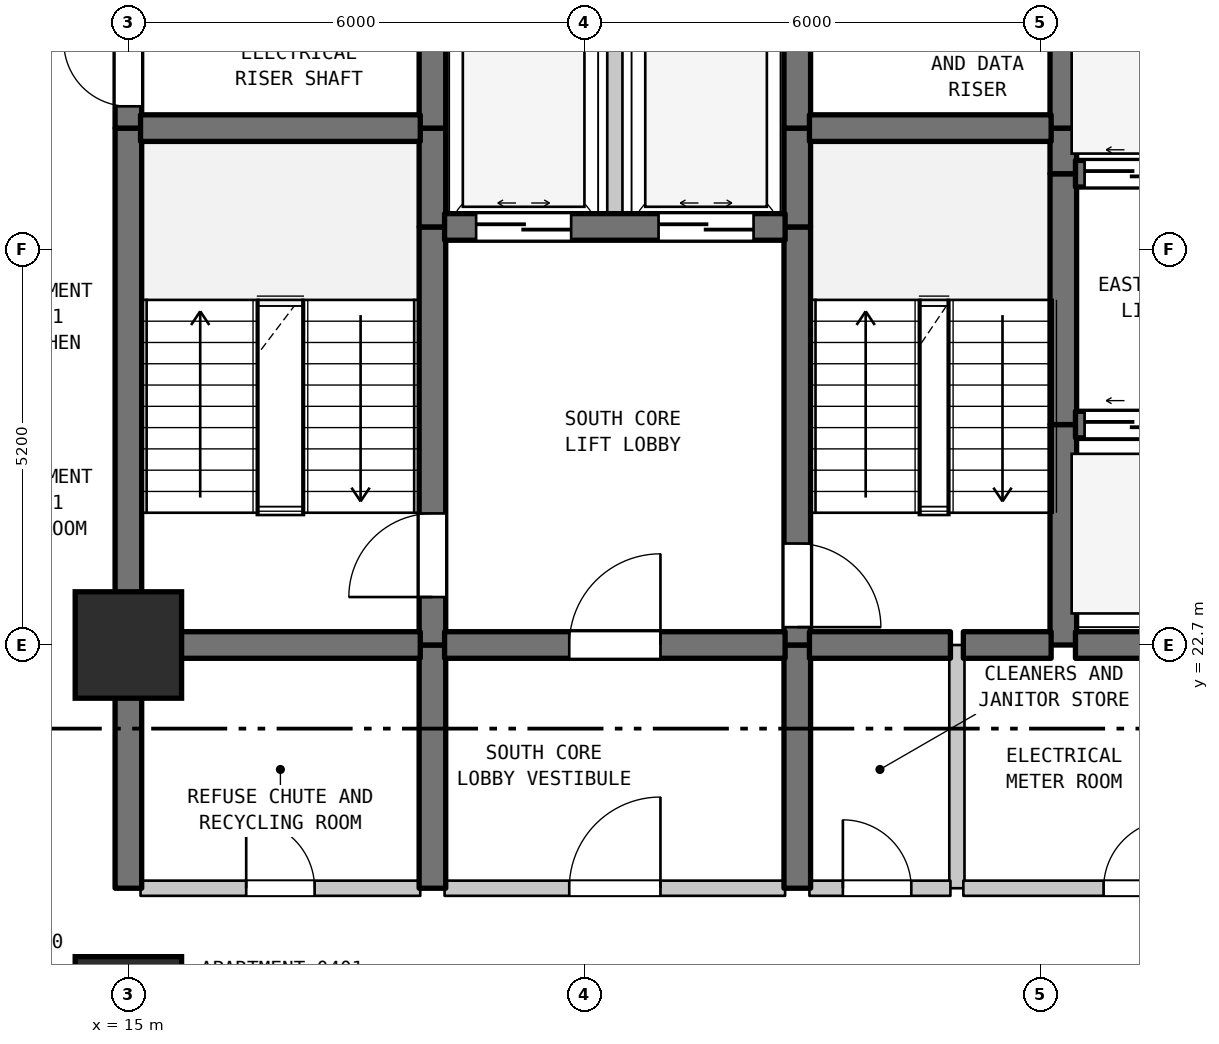
"""IFC4 building model, lengths in metres.
Left out: names, types, materials, properties, quantities, classifications, styles, units other than length and angle.
Written with IfcOpenShell. Run it as: python <this file> out.ifc"""

import sys

from ifc_helpers import new_model, si_unit, direction, frame, frame_2d, origin, origin_2d, place, context, subcontext, project, spatial, rectangle, extrude, element, fill, save


model = new_model("IFC4")
c1 = context("Model", 3, precision=1e-05, world=origin(), true_north=direction((0.0, 1.0)))
c2 = subcontext(c1, "Body", "Model", "MODEL_VIEW")
j1 = project(units=[si_unit("LENGTHUNIT", "METRE"), si_unit("PLANEANGLEUNIT", "RADIAN")], contexts=[c1])
p1 = place(None, origin())
s1 = spatial("IfcSite", under=j1, at=p1, CompositionType="ELEMENT")
p2 = place(p1, origin())
s2 = spatial("IfcBuilding", under=s1, at=p2, CompositionType="ELEMENT")
p3 = place(p2, frame((0.0, 0.0, 24.0)))
s3 = spatial("IfcBuildingStorey", under=s2, at=p3, CompositionType="ELEMENT", Elevation=24.0)
for number, where, z_axis, x_axis in (
    (1, (15.0, 17.9, 0.0), (0.0, 0.0, 1.0), (1.0, 0.0, 0.0)),
    (2, (15.0, 22.7, 0.0), (0.0, 0.0, 1.0), (1.0, 0.0, 0.0)),
):
    element("IfcColumn", number, at=place(p3, frame(where, z_axis=z_axis, x_axis=x_axis)), inside=s3, PredefinedType="COLUMN", context=c2, shape_type="SweptSolid", body=[
        extrude(rectangle(XDim=1.4, YDim=1.4, at=origin_2d()), origin(), (0.0, 0.0, 1.0), 3.7),
    ])
p4 = place(p3, frame((15.0, 19.5, 0.0), z_axis=(0.0, 0.0, 1.0), x_axis=(0.0, 1.0, 0.0)))
e3 = element("IfcWall", 3, at=p4, inside=s3, PredefinedType="SHEAR", context=c2, shape_type="SweptSolid", body=[
    extrude(rectangle(XDim=3.2, YDim=0.35, at=frame_2d((1.6, 0.0))), origin(), (0.0, 0.0, 1.0), 3.385),
])
p5 = place(p3, frame((15.0, 22.7, 0.0), z_axis=(0.0, 0.0, 1.0), x_axis=(0.0, 1.0, 0.0)))
e4 = element("IfcWall", 4, at=p5, inside=s3, PredefinedType="SHEAR", context=c2, shape_type="SweptSolid", body=[
    extrude(rectangle(XDim=6.8, YDim=0.35, at=frame_2d((3.4, 0.0))), origin(), (0.0, 0.0, 1.0), 3.385),
])
p6 = place(p3, frame((15.0, 29.5, 0.0), z_axis=(0.0, 0.0, 1.0), x_axis=(0.0, 1.0, 0.0)))
e5 = element("IfcWall", 5, at=p6, inside=s3, PredefinedType="SHEAR", context=c2, shape_type="SweptSolid", body=[
    extrude(rectangle(XDim=1.6, YDim=0.35, at=frame_2d((0.8, 0.0))), origin(), (0.0, 0.0, 1.0), 3.385),
])
p7 = place(p6, frame((0.287, 0.0, 0.0)))
e6 = element("IfcOpeningElement", 6, at=p7, cuts=e5, PredefinedType="OPENING", context=c2, shape_type="SweptSolid", body=[
    extrude(rectangle(XDim=0.85, YDim=2.1, at=frame_2d((0.425, 1.05))), frame((0.0, 0.185, 0.0), z_axis=(0.0, -1.0, 0.0), x_axis=(1.0, 0.0, 0.0)), (0.0, 0.0, 1.0), 0.37),
])
p8 = place(p3, frame((19.0, 19.5, 0.0), z_axis=(0.0, 0.0, 1.0), x_axis=(0.0, 1.0, 0.0)))
e7 = element("IfcWall", 7, at=p8, inside=s3, PredefinedType="SHEAR", context=c2, shape_type="SweptSolid", body=[
    extrude(rectangle(XDim=3.2, YDim=0.35, at=frame_2d((1.6, 0.0))), origin(), (0.0, 0.0, 1.0), 3.385),
])
p9 = place(p3, frame((19.0, 22.7, 0.0), z_axis=(0.0, 0.0, 1.0), x_axis=(0.0, 1.0, 0.0)))
e8 = element("IfcWall", 8, at=p9, inside=s3, PredefinedType="SHEAR", context=c2, shape_type="SweptSolid", body=[
    extrude(rectangle(XDim=5.5, YDim=0.35, at=frame_2d((2.75, 0.0))), origin(), (0.0, 0.0, 1.0), 3.385),
])
p10 = place(p9, frame((0.631, 0.0, 0.0)))
e9 = element("IfcOpeningElement", 9, at=p10, cuts=e8, PredefinedType="OPENING", context=c2, shape_type="SweptSolid", body=[
    extrude(rectangle(XDim=1.1, YDim=2.15, at=frame_2d((0.55, 1.075))), frame((0.0, 0.185, 0.0), z_axis=(0.0, -1.0, 0.0), x_axis=(1.0, 0.0, 0.0)), (0.0, 0.0, 1.0), 0.37),
])
p11 = place(p3, frame((19.0, 28.2, 0.0), z_axis=(0.0, 0.0, 1.0), x_axis=(0.0, 1.0, 0.0)))
e10 = element("IfcWall", 10, at=p11, inside=s3, PredefinedType="SHEAR", context=c2, shape_type="SweptSolid", body=[
    extrude(rectangle(XDim=1.3, YDim=0.35, at=frame_2d((0.65, 0.0))), origin(), (0.0, 0.0, 1.0), 3.385),
])
p12 = place(p3, frame((19.0, 29.5, 0.0), z_axis=(0.0, 0.0, 1.0), x_axis=(0.0, 1.0, 0.0)))
e11 = element("IfcWall", 11, at=p12, inside=s3, PredefinedType="SHEAR", context=c2, shape_type="SweptSolid", body=[
    extrude(rectangle(XDim=5.5, YDim=0.35, at=frame_2d((2.75, 0.0))), origin(), (0.0, 0.0, 1.0), 3.385),
])
p13 = place(p12, frame((2.025, 0.0, 0.0)))
e12 = element("IfcOpeningElement", 12, at=p13, cuts=e11, PredefinedType="OPENING", context=c2, shape_type="SweptSolid", body=[
    extrude(rectangle(XDim=1.1, YDim=2.15, at=frame_2d((0.55, 1.075))), frame((0.0, 0.185, 0.0), z_axis=(0.0, -1.0, 0.0), x_axis=(1.0, 0.0, 0.0)), (0.0, 0.0, 1.0), 0.37),
])
p14 = place(p3, frame((21.4, 28.2, 0.0), z_axis=(0.0, 0.0, 1.0), x_axis=(0.0, 1.0, 0.0)))
e13 = element("IfcWall", 13, at=p14, inside=s3, PredefinedType="STANDARD", context=c2, shape_type="SweptSolid", body=[
    extrude(rectangle(XDim=2.6, YDim=0.2, at=frame_2d((1.3, 0.0))), origin(), (0.0, 0.0, 1.0), 3.385),
])
p15 = place(p3, frame((23.8, 19.5, 0.0), z_axis=(0.0, 0.0, 1.0), x_axis=(0.0, 1.0, 0.0)))
e14 = element("IfcWall", 14, at=p15, inside=s3, PredefinedType="SHEAR", context=c2, shape_type="SweptSolid", body=[
    extrude(rectangle(XDim=3.2, YDim=0.35, at=frame_2d((1.6, 0.0))), origin(), (0.0, 0.0, 1.0), 3.385),
])
p16 = place(p3, frame((23.8, 22.7, 0.0), z_axis=(0.0, 0.0, 1.0), x_axis=(0.0, 1.0, 0.0)))
e15 = element("IfcWall", 15, at=p16, inside=s3, PredefinedType="SHEAR", context=c2, shape_type="SweptSolid", body=[
    extrude(rectangle(XDim=5.5, YDim=0.35, at=frame_2d((2.75, 0.0))), origin(), (0.0, 0.0, 1.0), 3.385),
])
p17 = place(p16, frame((0.235, 0.0, 0.0)))
e16 = element("IfcOpeningElement", 16, at=p17, cuts=e15, PredefinedType="OPENING", context=c2, shape_type="SweptSolid", body=[
    extrude(rectangle(XDim=1.1, YDim=2.15, at=frame_2d((0.55, 1.075))), frame((0.0, 0.185, 0.0), z_axis=(0.0, -1.0, 0.0), x_axis=(1.0, 0.0, 0.0)), (0.0, 0.0, 1.0), 0.37),
])
for number, where, z_axis, x_axis in (
    (17, (23.8, 28.2, 0.0), (0.0, 0.0, 1.0), (0.0, 1.0, 0.0)),
    (18, (23.8, 29.5, 0.0), (0.0, 0.0, 1.0), (0.0, 1.0, 0.0)),
):
    element("IfcWall", number, at=place(p3, frame(where, z_axis=z_axis, x_axis=x_axis)), inside=s3, PredefinedType="SHEAR", context=c2, shape_type="SweptSolid", body=[
        extrude(rectangle(XDim=1.3, YDim=0.35, at=frame_2d((0.65, 0.0))), origin(), (0.0, 0.0, 1.0), 3.385),
    ])
p18 = place(p3, frame((25.9, 19.5, 0.0), z_axis=(0.0, 0.0, 1.0), x_axis=(0.0, 1.0, 0.0)))
e19 = element("IfcWall", 19, at=p18, inside=s3, PredefinedType="STANDARD", context=c2, shape_type="SweptSolid", body=[
    extrude(rectangle(XDim=3.2, YDim=0.2, at=frame_2d((1.6, 0.0))), origin(), (0.0, 0.0, 1.0), 3.385),
])
p19 = place(p3, frame((27.3, 22.7, 0.0), z_axis=(0.0, 0.0, 1.0), x_axis=(0.0, 1.0, 0.0)))
e20 = element("IfcWall", 20, at=p19, inside=s3, PredefinedType="SHEAR", context=c2, shape_type="SweptSolid", body=[
    extrude(rectangle(XDim=2.9, YDim=0.35, at=frame_2d((1.45, 0.0))), origin(), (0.0, 0.0, 1.0), 3.385),
])
p20 = place(p3, frame((27.3, 25.6, 0.0), z_axis=(0.0, 0.0, 1.0), x_axis=(0.0, 1.0, 0.0)))
e21 = element("IfcWall", 21, at=p20, inside=s3, PredefinedType="SHEAR", context=c2, shape_type="SweptSolid", body=[
    extrude(rectangle(XDim=3.3, YDim=0.35, at=frame_2d((1.65, 0.0))), origin(), (0.0, 0.0, 1.0), 3.385),
])
p21 = place(p3, frame((27.3, 28.9, 0.0), z_axis=(0.0, 0.0, 1.0), x_axis=(0.0, 1.0, 0.0)))
e22 = element("IfcWall", 22, at=p21, inside=s3, PredefinedType="SHEAR", context=c2, shape_type="SweptSolid", body=[
    extrude(rectangle(XDim=0.6, YDim=0.35, at=frame_2d((0.3, 0.0))), origin(), (0.0, 0.0, 1.0), 3.385),
])
p22 = place(p3, frame((27.3, 29.5, 0.0), z_axis=(0.0, 0.0, 1.0), x_axis=(0.0, 1.0, 0.0)))
e23 = element("IfcWall", 23, at=p22, inside=s3, PredefinedType="SHEAR", context=c2, shape_type="SweptSolid", body=[
    extrude(rectangle(XDim=2.0, YDim=0.35, at=frame_2d((1.0, 0.0))), origin(), (0.0, 0.0, 1.0), 3.385),
])
p23 = place(p3, frame((15.16, 19.5, 0.0), z_axis=(0.0, 0.0, 1.0), x_axis=(1.0, 0.0, 0.0)))
e24 = element("IfcWall", 24, at=p23, inside=s3, PredefinedType="STANDARD", context=c2, shape_type="SweptSolid", body=[
    extrude(rectangle(XDim=3.68, YDim=0.2, at=frame_2d((1.84, 0.0))), origin(), (0.0, 0.0, 1.0), 3.385),
])
p24 = place(p23, frame((1.39, 0.0, 0.0)))
e25 = element("IfcOpeningElement", 25, at=p24, cuts=e24, PredefinedType="OPENING", context=c2, shape_type="SweptSolid", body=[
    extrude(rectangle(XDim=0.9, YDim=2.15, at=frame_2d((0.45, 1.075))), frame((0.0, 0.11, 0.0), z_axis=(0.0, -1.0, 0.0), x_axis=(1.0, 0.0, 0.0)), (0.0, 0.0, 1.0), 0.22),
])
p25 = place(p3, frame((19.16, 19.5, 0.0), z_axis=(0.0, 0.0, 1.0), x_axis=(1.0, 0.0, 0.0)))
e26 = element("IfcWall", 26, at=p25, inside=s3, PredefinedType="STANDARD", context=c2, shape_type="SweptSolid", body=[
    extrude(rectangle(XDim=4.48, YDim=0.2, at=frame_2d((2.24, 0.0))), origin(), (0.0, 0.0, 1.0), 3.385),
])
p26 = place(p25, frame((1.64, 0.0, 0.0)))
e27 = element("IfcOpeningElement", 27, at=p26, cuts=e26, PredefinedType="OPENING", context=c2, shape_type="SweptSolid", body=[
    extrude(rectangle(XDim=1.2, YDim=2.2, at=frame_2d((0.6, 1.1))), frame((0.0, 0.11, 0.0), z_axis=(0.0, -1.0, 0.0), x_axis=(1.0, 0.0, 0.0)), (0.0, 0.0, 1.0), 0.22),
])
p27 = place(p3, frame((23.96, 19.5, 0.0), z_axis=(0.0, 0.0, 1.0), x_axis=(1.0, 0.0, 0.0)))
e28 = element("IfcWall", 28, at=p27, inside=s3, PredefinedType="STANDARD", context=c2, shape_type="SweptSolid", body=[
    extrude(rectangle(XDim=1.855, YDim=0.2, at=frame_2d((0.927, 0.0))), origin(), (0.0, 0.0, 1.0), 3.385),
])
p28 = place(p27, frame((0.44, 0.0, 0.0)))
e29 = element("IfcOpeningElement", 29, at=p28, cuts=e28, PredefinedType="OPENING", context=c2, shape_type="SweptSolid", body=[
    extrude(rectangle(XDim=0.9, YDim=2.15, at=frame_2d((0.45, 1.075))), frame((0.0, 0.11, 0.0), z_axis=(0.0, -1.0, 0.0), x_axis=(1.0, 0.0, 0.0)), (0.0, 0.0, 1.0), 0.22),
])
p29 = place(p3, frame((25.985, 19.5, 0.0), z_axis=(0.0, 0.0, 1.0), x_axis=(1.0, 0.0, 0.0)))
e30 = element("IfcWall", 30, at=p29, inside=s3, PredefinedType="STANDARD", context=c2, shape_type="SweptSolid", body=[
    extrude(rectangle(XDim=4.655, YDim=0.2, at=frame_2d((2.327, 0.0))), origin(), (0.0, 0.0, 1.0), 3.385),
])
p30 = place(p29, frame((1.845, 0.0, 0.0)))
e31 = element("IfcOpeningElement", 31, at=p30, cuts=e30, PredefinedType="OPENING", context=c2, shape_type="SweptSolid", body=[
    extrude(rectangle(XDim=0.9, YDim=2.15, at=frame_2d((0.45, 1.075))), frame((0.0, 0.11, 0.0), z_axis=(0.0, -1.0, 0.0), x_axis=(1.0, 0.0, 0.0)), (0.0, 0.0, 1.0), 0.22),
])
p31 = place(p3, frame((15.16, 22.7, 0.0), z_axis=(0.0, 0.0, 1.0), x_axis=(1.0, 0.0, 0.0)))
e32 = element("IfcWall", 32, at=p31, inside=s3, PredefinedType="SHEAR", context=c2, shape_type="SweptSolid", body=[
    extrude(rectangle(XDim=3.68, YDim=0.35, at=frame_2d((1.84, 0.0))), origin(), (0.0, 0.0, 1.0), 3.385),
])
p32 = place(p3, frame((19.16, 22.7, 0.0), z_axis=(0.0, 0.0, 1.0), x_axis=(1.0, 0.0, 0.0)))
e33 = element("IfcWall", 33, at=p32, inside=s3, PredefinedType="SHEAR", context=c2, shape_type="SweptSolid", body=[
    extrude(rectangle(XDim=4.48, YDim=0.35, at=frame_2d((2.24, 0.0))), origin(), (0.0, 0.0, 1.0), 3.385),
])
p33 = place(p32, frame((1.64, 0.0, 0.0)))
e34 = element("IfcOpeningElement", 34, at=p33, cuts=e33, PredefinedType="OPENING", context=c2, shape_type="SweptSolid", body=[
    extrude(rectangle(XDim=1.2, YDim=2.2, at=frame_2d((0.6, 1.1))), frame((0.0, 0.185, 0.0), z_axis=(0.0, -1.0, 0.0), x_axis=(1.0, 0.0, 0.0)), (0.0, 0.0, 1.0), 0.37),
])
p34 = place(p3, frame((23.96, 22.7, 0.0), z_axis=(0.0, 0.0, 1.0), x_axis=(1.0, 0.0, 0.0)))
e35 = element("IfcWall", 35, at=p34, inside=s3, PredefinedType="SHEAR", context=c2, shape_type="SweptSolid", body=[
    extrude(rectangle(XDim=1.855, YDim=0.35, at=frame_2d((0.927, 0.0))), origin(), (0.0, 0.0, 1.0), 3.385),
])
p35 = place(p3, frame((25.985, 22.7, 0.0), z_axis=(0.0, 0.0, 1.0), x_axis=(1.0, 0.0, 0.0)))
e36 = element("IfcWall", 36, at=p35, inside=s3, PredefinedType="SHEAR", context=c2, shape_type="SweptSolid", body=[
    extrude(rectangle(XDim=1.155, YDim=0.35, at=frame_2d((0.577, 0.0))), origin(), (0.0, 0.0, 1.0), 3.385),
])
p36 = place(p3, frame((27.46, 22.7, 0.0), z_axis=(0.0, 0.0, 1.0), x_axis=(1.0, 0.0, 0.0)))
e37 = element("IfcWall", 37, at=p36, inside=s3, PredefinedType="SHEAR", context=c2, shape_type="SweptSolid", body=[
    extrude(rectangle(XDim=3.18, YDim=0.35, at=frame_2d((1.59, 0.0))), origin(), (0.0, 0.0, 1.0), 3.385),
])
p37 = place(p3, frame((27.46, 25.6, 0.0), z_axis=(0.0, 0.0, 1.0), x_axis=(1.0, 0.0, 0.0)))
e38 = element("IfcWall", 38, at=p37, inside=s3, PredefinedType="SHEAR", context=c2, shape_type="SweptSolid", body=[
    extrude(rectangle(XDim=3.18, YDim=0.35, at=frame_2d((1.59, 0.0))), origin(), (0.0, 0.0, 1.0), 3.385),
])
p38 = place(p37, frame((0.12, 0.0, 0.0)))
e39 = element("IfcOpeningElement", 39, at=p38, cuts=e38, PredefinedType="OPENING", context=c2, shape_type="SweptSolid", body=[
    extrude(rectangle(XDim=1.25, YDim=2.2, at=frame_2d((0.625, 1.1))), frame((0.0, 0.185, 0.0), z_axis=(0.0, -1.0, 0.0), x_axis=(1.0, 0.0, 0.0)), (0.0, 0.0, 1.0), 0.37),
])
p39 = place(p37, frame((1.81, 0.0, 0.0)))
e40 = element("IfcOpeningElement", 40, at=p39, cuts=e38, PredefinedType="OPENING", context=c2, shape_type="SweptSolid", body=[
    extrude(rectangle(XDim=1.25, YDim=2.2, at=frame_2d((0.625, 1.1))), frame((0.0, 0.185, 0.0), z_axis=(0.0, -1.0, 0.0), x_axis=(1.0, 0.0, 0.0)), (0.0, 0.0, 1.0), 0.37),
])
p40 = place(p3, frame((19.16, 28.2, 0.0), z_axis=(0.0, 0.0, 1.0), x_axis=(1.0, 0.0, 0.0)))
e41 = element("IfcWall", 41, at=p40, inside=s3, PredefinedType="SHEAR", context=c2, shape_type="SweptSolid", body=[
    extrude(rectangle(XDim=4.48, YDim=0.35, at=frame_2d((2.24, 0.0))), origin(), (0.0, 0.0, 1.0), 3.385),
])
p41 = place(p40, frame((0.415, 0.0, 0.0)))
e42 = element("IfcOpeningElement", 42, at=p41, cuts=e41, PredefinedType="OPENING", context=c2, shape_type="SweptSolid", body=[
    extrude(rectangle(XDim=1.25, YDim=2.2, at=frame_2d((0.625, 1.1))), frame((0.0, 0.185, 0.0), z_axis=(0.0, -1.0, 0.0), x_axis=(1.0, 0.0, 0.0)), (0.0, 0.0, 1.0), 0.37),
])
p42 = place(p40, frame((2.815, 0.0, 0.0)))
e43 = element("IfcOpeningElement", 43, at=p42, cuts=e41, PredefinedType="OPENING", context=c2, shape_type="SweptSolid", body=[
    extrude(rectangle(XDim=1.25, YDim=2.2, at=frame_2d((0.625, 1.1))), frame((0.0, 0.185, 0.0), z_axis=(0.0, -1.0, 0.0), x_axis=(1.0, 0.0, 0.0)), (0.0, 0.0, 1.0), 0.37),
])
p43 = place(p3, frame((27.46, 28.9, 0.0), z_axis=(0.0, 0.0, 1.0), x_axis=(1.0, 0.0, 0.0)))
e44 = element("IfcWall", 44, at=p43, inside=s3, PredefinedType="SHEAR", context=c2, shape_type="SweptSolid", body=[
    extrude(rectangle(XDim=3.18, YDim=0.35, at=frame_2d((1.59, 0.0))), origin(), (0.0, 0.0, 1.0), 3.385),
])
p44 = place(p43, frame((0.12, 0.0, 0.0)))
e45 = element("IfcOpeningElement", 45, at=p44, cuts=e44, PredefinedType="OPENING", context=c2, shape_type="SweptSolid", body=[
    extrude(rectangle(XDim=1.25, YDim=2.2, at=frame_2d((0.625, 1.1))), frame((0.0, 0.185, 0.0), z_axis=(0.0, -1.0, 0.0), x_axis=(1.0, 0.0, 0.0)), (0.0, 0.0, 1.0), 0.37),
])
p45 = place(p43, frame((1.81, 0.0, 0.0)))
e46 = element("IfcOpeningElement", 46, at=p45, cuts=e44, PredefinedType="OPENING", context=c2, shape_type="SweptSolid", body=[
    extrude(rectangle(XDim=1.25, YDim=2.2, at=frame_2d((0.625, 1.1))), frame((0.0, 0.185, 0.0), z_axis=(0.0, -1.0, 0.0), x_axis=(1.0, 0.0, 0.0)), (0.0, 0.0, 1.0), 0.37),
])
p46 = place(p3, frame((15.16, 29.5, 0.0), z_axis=(0.0, 0.0, 1.0), x_axis=(1.0, 0.0, 0.0)))
e47 = element("IfcWall", 47, at=p46, inside=s3, PredefinedType="SHEAR", context=c2, shape_type="SweptSolid", body=[
    extrude(rectangle(XDim=3.68, YDim=0.35, at=frame_2d((1.84, 0.0))), origin(), (0.0, 0.0, 1.0), 3.385),
])
p47 = place(p3, frame((23.96, 29.5, 0.0), z_axis=(0.0, 0.0, 1.0), x_axis=(1.0, 0.0, 0.0)))
e48 = element("IfcWall", 48, at=p47, inside=s3, PredefinedType="SHEAR", context=c2, shape_type="SweptSolid", body=[
    extrude(rectangle(XDim=3.18, YDim=0.35, at=frame_2d((1.59, 0.0))), origin(), (0.0, 0.0, 1.0), 3.385),
])
p48 = place(p7, origin())
e49 = element("IfcDoor", 49, at=p48, inside=s3, OperationType="SINGLE_SWING_RIGHT", PredefinedType="DOOR", context=c2, shape_type="SweptSolid", body=[
    extrude(rectangle(XDim=0.85, YDim=2.1, at=frame_2d((0.425, 1.05))), frame((0.0, 0.025, 0.0), z_axis=(0.0, -1.0, 0.0), x_axis=(1.0, 0.0, 0.0)), (0.0, 0.0, 1.0), 0.05),
])
fill(e6, e49)
p49 = place(p10, origin())
e50 = element("IfcDoor", 50, at=p49, inside=s3, OperationType="SINGLE_SWING_LEFT", PredefinedType="DOOR", context=c2, shape_type="SweptSolid", body=[
    extrude(rectangle(XDim=1.1, YDim=2.15, at=frame_2d((0.55, 1.075))), frame((0.0, 0.025, 0.0), z_axis=(0.0, -1.0, 0.0), x_axis=(1.0, 0.0, 0.0)), (0.0, 0.0, 1.0), 0.05),
])
fill(e9, e50)
p50 = place(p17, frame((1.1, 0.0, 0.0), z_axis=(0.0, 0.0, 1.0), x_axis=(-1.0, 0.0, 0.0)))
e51 = element("IfcDoor", 51, at=p50, inside=s3, OperationType="SINGLE_SWING_LEFT", PredefinedType="DOOR", context=c2, shape_type="SweptSolid", body=[
    extrude(rectangle(XDim=1.1, YDim=2.15, at=frame_2d((0.55, 1.075))), frame((0.0, 0.025, 0.0), z_axis=(0.0, -1.0, 0.0), x_axis=(1.0, 0.0, 0.0)), (0.0, 0.0, 1.0), 0.05),
])
fill(e16, e51)
p51 = place(p24, origin())
e52 = element("IfcDoor", 52, at=p51, inside=s3, OperationType="SINGLE_SWING_LEFT", PredefinedType="DOOR", context=c2, shape_type="SweptSolid", body=[
    extrude(rectangle(XDim=0.9, YDim=2.15, at=frame_2d((0.45, 1.075))), frame((0.0, 0.025, 0.0), z_axis=(0.0, -1.0, 0.0), x_axis=(1.0, 0.0, 0.0)), (0.0, 0.0, 1.0), 0.05),
])
fill(e25, e52)
p52 = place(p26, origin())
e53 = element("IfcDoor", 53, at=p52, inside=s3, OperationType="SINGLE_SWING_RIGHT", PredefinedType="DOOR", context=c2, shape_type="SweptSolid", body=[
    extrude(rectangle(XDim=1.2, YDim=2.2, at=frame_2d((0.6, 1.1))), frame((0.0, 0.025, 0.0), z_axis=(0.0, -1.0, 0.0), x_axis=(1.0, 0.0, 0.0)), (0.0, 0.0, 1.0), 0.05),
])
fill(e27, e53)
p53 = place(p28, origin())
e54 = element("IfcDoor", 54, at=p53, inside=s3, OperationType="SINGLE_SWING_LEFT", PredefinedType="DOOR", context=c2, shape_type="SweptSolid", body=[
    extrude(rectangle(XDim=0.9, YDim=2.15, at=frame_2d((0.45, 1.075))), frame((0.0, 0.025, 0.0), z_axis=(0.0, -1.0, 0.0), x_axis=(1.0, 0.0, 0.0)), (0.0, 0.0, 1.0), 0.05),
])
fill(e29, e54)
p54 = place(p30, origin())
e55 = element("IfcDoor", 55, at=p54, inside=s3, OperationType="SINGLE_SWING_RIGHT", PredefinedType="DOOR", context=c2, shape_type="SweptSolid", body=[
    extrude(rectangle(XDim=0.9, YDim=2.15, at=frame_2d((0.45, 1.075))), frame((0.0, 0.025, 0.0), z_axis=(0.0, -1.0, 0.0), x_axis=(1.0, 0.0, 0.0)), (0.0, 0.0, 1.0), 0.05),
])
fill(e31, e55)
p55 = place(p33, origin())
e56 = element("IfcDoor", 56, at=p55, inside=s3, OperationType="SINGLE_SWING_RIGHT", PredefinedType="DOOR", context=c2, shape_type="SweptSolid", body=[
    extrude(rectangle(XDim=1.2, YDim=2.2, at=frame_2d((0.6, 1.1))), frame((0.0, 0.025, 0.0), z_axis=(0.0, -1.0, 0.0), x_axis=(1.0, 0.0, 0.0)), (0.0, 0.0, 1.0), 0.05),
])
fill(e34, e56)
p56 = place(p38, origin())
e57 = element("IfcDoor", 57, at=p56, inside=s3, OperationType="DOUBLE_DOOR_SLIDING", PredefinedType="DOOR", context=c2, shape_type="SweptSolid", body=[
    extrude(rectangle(XDim=1.25, YDim=2.2, at=frame_2d((0.625, 1.1))), frame((0.0, 0.025, 0.0), z_axis=(0.0, -1.0, 0.0), x_axis=(1.0, 0.0, 0.0)), (0.0, 0.0, 1.0), 0.05),
])
fill(e39, e57)
p57 = place(p41, origin())
e58 = element("IfcDoor", 58, at=p57, inside=s3, OperationType="DOUBLE_DOOR_SLIDING", PredefinedType="DOOR", context=c2, shape_type="SweptSolid", body=[
    extrude(rectangle(XDim=1.25, YDim=2.2, at=frame_2d((0.625, 1.1))), frame((0.0, 0.025, 0.0), z_axis=(0.0, -1.0, 0.0), x_axis=(1.0, 0.0, 0.0)), (0.0, 0.0, 1.0), 0.05),
])
fill(e42, e58)
p58 = place(p42, origin())
e59 = element("IfcDoor", 59, at=p58, inside=s3, OperationType="DOUBLE_DOOR_SLIDING", PredefinedType="DOOR", context=c2, shape_type="SweptSolid", body=[
    extrude(rectangle(XDim=1.25, YDim=2.2, at=frame_2d((0.625, 1.1))), frame((0.0, 0.025, 0.0), z_axis=(0.0, -1.0, 0.0), x_axis=(1.0, 0.0, 0.0)), (0.0, 0.0, 1.0), 0.05),
])
fill(e43, e59)
p59 = place(p44, origin())
e60 = element("IfcDoor", 60, at=p59, inside=s3, OperationType="DOUBLE_DOOR_SLIDING", PredefinedType="DOOR", context=c2, shape_type="SweptSolid", body=[
    extrude(rectangle(XDim=1.25, YDim=2.2, at=frame_2d((0.625, 1.1))), frame((0.0, 0.025, 0.0), z_axis=(0.0, -1.0, 0.0), x_axis=(1.0, 0.0, 0.0)), (0.0, 0.0, 1.0), 0.05),
])
fill(e45, e60)
save(model, sys.argv[1])
